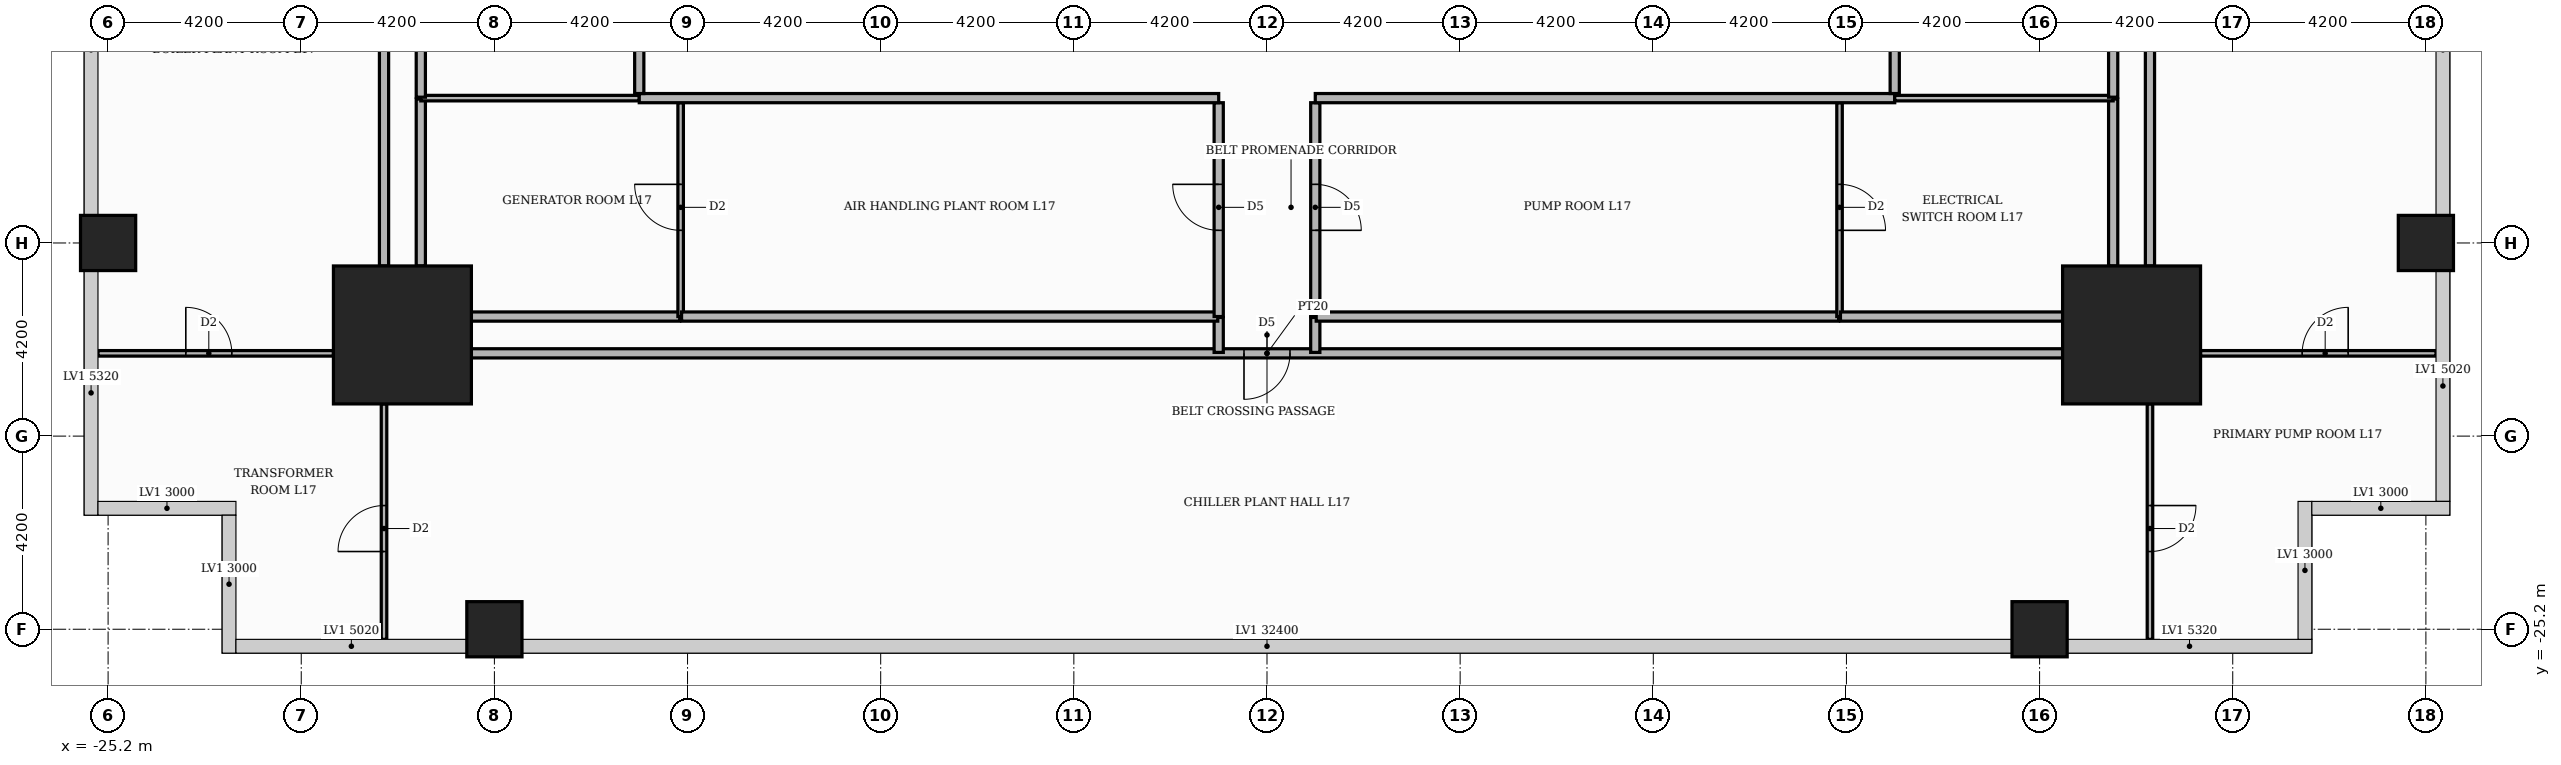
"""IFC4 building model, lengths in metres.
Left out: names, types, materials, properties, quantities, classifications, styles, units other than length and angle.
Written with IfcOpenShell. Run it as: python <this file> out.ifc"""

import sys

from ifc_helpers import new_model, si_unit, direction, frame, frame_2d, origin, origin_2d, place, context, subcontext, project, spatial, rectangle, extrude, element, fill, save


model = new_model("IFC4")
c1 = context("Model", 3, precision=1e-05, world=origin(), true_north=direction((0.0, 1.0)))
c2 = subcontext(c1, "Body", "Model", "MODEL_VIEW")
j1 = project(units=[si_unit("LENGTHUNIT", "METRE"), si_unit("PLANEANGLEUNIT", "RADIAN")], contexts=[c1])
p1 = place(None, origin())
s1 = spatial("IfcSite", under=j1, at=p1, CompositionType="ELEMENT")
p2 = place(p1, origin())
s2 = spatial("IfcBuilding", under=s1, at=p2, CompositionType="ELEMENT")
p3 = place(p2, frame((0.0, 0.0, 73.8)))
s3 = spatial("IfcBuildingStorey", under=s2, at=p3, CompositionType="ELEMENT", Elevation=73.8)
for number, where, z_axis, x_axis in (
    (1, (18.8, -18.8, 0.0), (0.0, 0.0, 1.0), (1.0, 0.0, 0.0)),
    (2, (-18.8, -18.8, 0.0), (0.0, 0.0, 1.0), (1.0, 0.0, 0.0)),
):
    element("IfcColumn", number, at=place(p3, frame(where, z_axis=z_axis, x_axis=x_axis)), inside=s3, PredefinedType="COLUMN", context=c2, shape_type="SweptSolid", body=[
        extrude(rectangle(XDim=3.0, YDim=3.0, at=origin_2d()), origin(), (0.0, 0.0, 1.0), 5.4),
    ])
for number, where, z_axis, x_axis in (
    (3, (25.2, -16.8, 0.0), (0.0, 0.0, 1.0), (1.0, 0.0, 0.0)),
    (4, (16.8, -25.2, 0.0), (0.0, 0.0, 1.0), (1.0, 0.0, 0.0)),
    (5, (-16.8, -25.2, 0.0), (0.0, 0.0, 1.0), (1.0, 0.0, 0.0)),
    (6, (-25.2, -16.8, 0.0), (0.0, 0.0, 1.0), (1.0, 0.0, 0.0)),
):
    element("IfcColumn", number, at=place(p3, frame(where, z_axis=z_axis, x_axis=x_axis)), inside=s3, PredefinedType="COLUMN", context=c2, shape_type="SweptSolid", body=[
        extrude(rectangle(XDim=1.2, YDim=1.2, at=origin_2d()), origin(), (0.0, 0.0, 1.0), 5.4),
    ])
p4 = place(p3, frame((-19.2, -25.42, 0.0), z_axis=(0.0, 0.0, 1.0), x_axis=(0.0, 1.0, 0.0)))
e7 = element("IfcWall", 7, at=p4, inside=s3, PredefinedType="PARTITIONING", context=c2, shape_type="SweptSolid", body=[
    extrude(rectangle(XDim=5.12, YDim=0.12, at=frame_2d((2.56, 0.0))), origin(), (0.0, 0.0, 1.0), 4.98),
])
p5 = place(p4, frame((1.91, 0.0, 0.0)))
e8 = element("IfcOpeningElement", 8, at=p5, cuts=e7, PredefinedType="OPENING", context=c2, shape_type="SweptSolid", body=[
    extrude(rectangle(XDim=1.0, YDim=2.1, at=frame_2d((0.5, 1.05))), frame((0.0, 0.07, 0.0), z_axis=(0.0, -1.0, 0.0), x_axis=(1.0, 0.0, 0.0)), (0.0, 0.0, 1.0), 0.14),
])
p6 = place(p3, frame((19.2, -25.42, 0.0), z_axis=(0.0, 0.0, 1.0), x_axis=(0.0, 1.0, 0.0)))
e9 = element("IfcWall", 9, at=p6, inside=s3, PredefinedType="PARTITIONING", context=c2, shape_type="SweptSolid", body=[
    extrude(rectangle(XDim=5.12, YDim=0.12, at=frame_2d((2.56, 0.0))), origin(), (0.0, 0.0, 1.0), 4.98),
])
p7 = place(p6, frame((1.91, 0.0, 0.0)))
e10 = element("IfcOpeningElement", 10, at=p7, cuts=e9, PredefinedType="OPENING", context=c2, shape_type="SweptSolid", body=[
    extrude(rectangle(XDim=1.0, YDim=2.1, at=frame_2d((0.5, 1.05))), frame((0.0, 0.07, 0.0), z_axis=(0.0, -1.0, 0.0), x_axis=(1.0, 0.0, 0.0)), (0.0, 0.0, 1.0), 0.14),
])
p8 = place(p3, frame((-25.42, -19.2, 0.0), z_axis=(0.0, 0.0, 1.0), x_axis=(1.0, 0.0, 0.0)))
e11 = element("IfcWall", 11, at=p8, inside=s3, PredefinedType="PARTITIONING", context=c2, shape_type="SweptSolid", body=[
    extrude(rectangle(XDim=5.12, YDim=0.12, at=frame_2d((2.56, 0.0))), origin(), (0.0, 0.0, 1.0), 4.98),
])
p9 = place(p8, frame((1.91, 0.0, 0.0)))
e12 = element("IfcOpeningElement", 12, at=p9, cuts=e11, PredefinedType="OPENING", context=c2, shape_type="SweptSolid", body=[
    extrude(rectangle(XDim=1.0, YDim=2.1, at=frame_2d((0.5, 1.05))), frame((0.0, 0.07, 0.0), z_axis=(0.0, -1.0, 0.0), x_axis=(1.0, 0.0, 0.0)), (0.0, 0.0, 1.0), 0.14),
])
p10 = place(p3, frame((-17.3, -19.2, 0.0), z_axis=(0.0, 0.0, 1.0), x_axis=(1.0, 0.0, 0.0)))
e13 = element("IfcWall", 13, at=p10, inside=s3, PredefinedType="PARTITIONING", context=c2, shape_type="SweptSolid", body=[
    extrude(rectangle(XDim=34.6, YDim=0.2, at=frame_2d((17.3, 0.0))), origin(), (0.0, 0.0, 1.0), 4.98),
])
p11 = place(p10, frame((16.8, 0.0, 0.0)))
e14 = element("IfcOpeningElement", 14, at=p11, cuts=e13, PredefinedType="OPENING", context=c2, shape_type="SweptSolid", body=[
    extrude(rectangle(XDim=1.0, YDim=2.1, at=frame_2d((0.5, 1.05))), frame((0.0, 0.11, 0.0), z_axis=(0.0, -1.0, 0.0), x_axis=(1.0, 0.0, 0.0)), (0.0, 0.0, 1.0), 0.22),
])
p12 = place(p3, frame((20.3, -19.2, 0.0), z_axis=(0.0, 0.0, 1.0), x_axis=(1.0, 0.0, 0.0)))
e15 = element("IfcWall", 15, at=p12, inside=s3, PredefinedType="PARTITIONING", context=c2, shape_type="SweptSolid", body=[
    extrude(rectangle(XDim=5.12, YDim=0.12, at=frame_2d((2.56, 0.0))), origin(), (0.0, 0.0, 1.0), 4.98),
])
p13 = place(p12, frame((2.21, 0.0, 0.0)))
e16 = element("IfcOpeningElement", 16, at=p13, cuts=e15, PredefinedType="OPENING", context=c2, shape_type="SweptSolid", body=[
    extrude(rectangle(XDim=1.0, YDim=2.1, at=frame_2d((0.5, 1.05))), frame((0.0, 0.07, 0.0), z_axis=(0.0, -1.0, 0.0), x_axis=(1.0, 0.0, 0.0)), (0.0, 0.0, 1.0), 0.14),
])
for number, where, z_axis, x_axis in (
    (17, (-1.05, -19.18, 0.0), (0.0, 0.0, 1.0), (0.0, 1.0, 0.0)),
    (18, (1.05, -19.18, 0.0), (0.0, 0.0, 1.0), (0.0, 1.0, 0.0)),
):
    element("IfcWall", number, at=place(p3, frame(where, z_axis=z_axis, x_axis=x_axis)), inside=s3, PredefinedType="PARTITIONING", context=c2, shape_type="SweptSolid", body=[
        extrude(rectangle(XDim=0.76, YDim=0.2, at=frame_2d((0.38, 0.0))), origin(), (0.0, 0.0, 1.0), 4.98),
    ])
p14 = place(p3, frame((-17.3, -18.4, 0.0), z_axis=(0.0, 0.0, 1.0), x_axis=(1.0, 0.0, 0.0)))
e19 = element("IfcWall", 19, at=p14, inside=s3, PredefinedType="PARTITIONING", context=c2, shape_type="SweptSolid", body=[
    extrude(rectangle(XDim=4.53, YDim=0.2, at=frame_2d((2.265, 0.0))), origin(), (0.0, 0.0, 1.0), 4.98),
])
p15 = place(p3, frame((-12.75, -18.4, 0.0), z_axis=(0.0, 0.0, 1.0), x_axis=(0.0, 1.0, 0.0)))
e20 = element("IfcWall", 20, at=p15, inside=s3, PredefinedType="PARTITIONING", context=c2, shape_type="SweptSolid", body=[
    extrude(rectangle(XDim=4.65, YDim=0.12, at=frame_2d((2.325, 0.0))), origin(), (0.0, 0.0, 1.0), 4.98),
])
p16 = place(p15, frame((1.875, 0.0, 0.0)))
e21 = element("IfcOpeningElement", 21, at=p16, cuts=e20, PredefinedType="OPENING", context=c2, shape_type="SweptSolid", body=[
    extrude(rectangle(XDim=1.0, YDim=2.1, at=frame_2d((0.5, 1.05))), frame((0.0, 0.07, 0.0), z_axis=(0.0, -1.0, 0.0), x_axis=(1.0, 0.0, 0.0)), (0.0, 0.0, 1.0), 0.14),
])
p17 = place(p3, frame((-12.73, -18.4, 0.0), z_axis=(0.0, 0.0, 1.0), x_axis=(1.0, 0.0, 0.0)))
e22 = element("IfcWall", 22, at=p17, inside=s3, PredefinedType="PARTITIONING", context=c2, shape_type="SweptSolid", body=[
    extrude(rectangle(XDim=11.66, YDim=0.2, at=frame_2d((5.83, 0.0))), origin(), (0.0, 0.0, 1.0), 4.98),
])
p18 = place(p3, frame((-1.05, -18.4, 0.0), z_axis=(0.0, 0.0, 1.0), x_axis=(0.0, 1.0, 0.0)))
e23 = element("IfcWall", 23, at=p18, inside=s3, PredefinedType="PARTITIONING", context=c2, shape_type="SweptSolid", body=[
    extrude(rectangle(XDim=4.65, YDim=0.2, at=frame_2d((2.325, 0.0))), origin(), (0.0, 0.0, 1.0), 4.98),
])
p19 = place(p18, frame((1.875, 0.0, 0.0)))
e24 = element("IfcOpeningElement", 24, at=p19, cuts=e23, PredefinedType="OPENING", context=c2, shape_type="SweptSolid", body=[
    extrude(rectangle(XDim=1.0, YDim=2.1, at=frame_2d((0.5, 1.05))), frame((0.0, 0.11, 0.0), z_axis=(0.0, -1.0, 0.0), x_axis=(1.0, 0.0, 0.0)), (0.0, 0.0, 1.0), 0.22),
])
p20 = place(p3, frame((1.05, -18.4, 0.0), z_axis=(0.0, 0.0, 1.0), x_axis=(0.0, 1.0, 0.0)))
e25 = element("IfcWall", 25, at=p20, inside=s3, PredefinedType="PARTITIONING", context=c2, shape_type="SweptSolid", body=[
    extrude(rectangle(XDim=4.65, YDim=0.2, at=frame_2d((2.325, 0.0))), origin(), (0.0, 0.0, 1.0), 4.98),
])
p21 = place(p20, frame((1.875, 0.0, 0.0)))
e26 = element("IfcOpeningElement", 26, at=p21, cuts=e25, PredefinedType="OPENING", context=c2, shape_type="SweptSolid", body=[
    extrude(rectangle(XDim=1.0, YDim=2.1, at=frame_2d((0.5, 1.05))), frame((0.0, 0.11, 0.0), z_axis=(0.0, -1.0, 0.0), x_axis=(1.0, 0.0, 0.0)), (0.0, 0.0, 1.0), 0.22),
])
p22 = place(p3, frame((1.07, -18.4, 0.0), z_axis=(0.0, 0.0, 1.0), x_axis=(1.0, 0.0, 0.0)))
e27 = element("IfcWall", 27, at=p22, inside=s3, PredefinedType="PARTITIONING", context=c2, shape_type="SweptSolid", body=[
    extrude(rectangle(XDim=11.36, YDim=0.2, at=frame_2d((5.68, 0.0))), origin(), (0.0, 0.0, 1.0), 4.98),
])
p23 = place(p3, frame((12.45, -18.4, 0.0), z_axis=(0.0, 0.0, 1.0), x_axis=(0.0, 1.0, 0.0)))
e28 = element("IfcWall", 28, at=p23, inside=s3, PredefinedType="PARTITIONING", context=c2, shape_type="SweptSolid", body=[
    extrude(rectangle(XDim=4.65, YDim=0.12, at=frame_2d((2.325, 0.0))), origin(), (0.0, 0.0, 1.0), 4.98),
])
p24 = place(p23, frame((1.875, 0.0, 0.0)))
e29 = element("IfcOpeningElement", 29, at=p24, cuts=e28, PredefinedType="OPENING", context=c2, shape_type="SweptSolid", body=[
    extrude(rectangle(XDim=1.0, YDim=2.1, at=frame_2d((0.5, 1.05))), frame((0.0, 0.07, 0.0), z_axis=(0.0, -1.0, 0.0), x_axis=(1.0, 0.0, 0.0)), (0.0, 0.0, 1.0), 0.14),
])
p25 = place(p3, frame((12.47, -18.4, 0.0), z_axis=(0.0, 0.0, 1.0), x_axis=(1.0, 0.0, 0.0)))
e30 = element("IfcWall", 30, at=p25, inside=s3, PredefinedType="PARTITIONING", context=c2, shape_type="SweptSolid", body=[
    extrude(rectangle(XDim=4.83, YDim=0.2, at=frame_2d((2.415, 0.0))), origin(), (0.0, 0.0, 1.0), 4.98),
])
p26 = place(p3, frame((-19.2, -17.3, 0.0), z_axis=(0.0, 0.0, 1.0), x_axis=(0.0, 1.0, 0.0)))
e31 = element("IfcWall", 31, at=p26, inside=s3, PredefinedType="PARTITIONING", context=c2, shape_type="SweptSolid", body=[
    extrude(rectangle(XDim=13.08, YDim=0.2, at=frame_2d((6.54, 0.0))), origin(), (0.0, 0.0, 1.0), 4.98),
])
for number, where, z_axis, x_axis in (
    (32, (-18.4, -17.3, 0.0), (0.0, 0.0, 1.0), (0.0, 1.0, 0.0)),
    (33, (18.4, -17.3, 0.0), (0.0, 0.0, 1.0), (0.0, 1.0, 0.0)),
):
    element("IfcWall", number, at=place(p3, frame(where, z_axis=z_axis, x_axis=x_axis)), inside=s3, PredefinedType="PARTITIONING", context=c2, shape_type="SweptSolid", body=[
        extrude(rectangle(XDim=3.63, YDim=0.2, at=frame_2d((1.815, 0.0))), origin(), (0.0, 0.0, 1.0), 4.98),
    ])
p27 = place(p3, frame((19.2, -17.3, 0.0), z_axis=(0.0, 0.0, 1.0), x_axis=(0.0, 1.0, 0.0)))
e34 = element("IfcWall", 34, at=p27, inside=s3, PredefinedType="PARTITIONING", context=c2, shape_type="SweptSolid", body=[
    extrude(rectangle(XDim=34.6, YDim=0.2, at=frame_2d((17.3, 0.0))), origin(), (0.0, 0.0, 1.0), 4.98),
])
p28 = place(p3, frame((-18.4, -13.65, 0.0), z_axis=(0.0, 0.0, 1.0), x_axis=(1.0, 0.0, 0.0)))
e35 = element("IfcWall", 35, at=p28, inside=s3, PredefinedType="PARTITIONING", context=c2, shape_type="SweptSolid", body=[
    extrude(rectangle(XDim=4.75, YDim=0.12, at=frame_2d((2.375, 0.0))), origin(), (0.0, 0.0, 1.0), 4.98),
])
for number, where, z_axis, x_axis in (
    (36, (-13.65, -13.65, 0.0), (0.0, 0.0, 1.0), (1.0, 0.0, 0.0)),
    (37, (1.05, -13.65, 0.0), (0.0, 0.0, 1.0), (1.0, 0.0, 0.0)),
):
    element("IfcWall", number, at=place(p3, frame(where, z_axis=z_axis, x_axis=x_axis)), inside=s3, PredefinedType="PARTITIONING", context=c2, shape_type="SweptSolid", body=[
        extrude(rectangle(XDim=12.6, YDim=0.2, at=frame_2d((6.3, 0.0))), origin(), (0.0, 0.0, 1.0), 4.98),
    ])
p29 = place(p3, frame((13.65, -13.65, 0.0), z_axis=(0.0, 0.0, 1.0), x_axis=(1.0, 0.0, 0.0)))
e38 = element("IfcWall", 38, at=p29, inside=s3, PredefinedType="PARTITIONING", context=c2, shape_type="SweptSolid", body=[
    extrude(rectangle(XDim=4.75, YDim=0.12, at=frame_2d((2.375, 0.0))), origin(), (0.0, 0.0, 1.0), 4.98),
])
p30 = place(p3, frame((-18.4, -13.63, 0.0), z_axis=(0.0, 0.0, 1.0), x_axis=(0.0, 1.0, 0.0)))
e39 = element("IfcWall", 39, at=p30, inside=s3, PredefinedType="PARTITIONING", context=c2, shape_type="SweptSolid", body=[
    extrude(rectangle(XDim=30.93, YDim=0.2, at=frame_2d((15.465, 0.0))), origin(), (0.0, 0.0, 1.0), 4.98),
])
p31 = place(p3, frame((18.4, -13.63, 0.0), z_axis=(0.0, 0.0, 1.0), x_axis=(0.0, 1.0, 0.0)))
e40 = element("IfcWall", 40, at=p31, inside=s3, PredefinedType="PARTITIONING", context=c2, shape_type="SweptSolid", body=[
    extrude(rectangle(XDim=12.41, YDim=0.2, at=frame_2d((6.205, 0.0))), origin(), (0.0, 0.0, 1.0), 4.98),
])
p32 = place(p3, frame((-13.65, -13.55, 0.0), z_axis=(0.0, 0.0, 1.0), x_axis=(0.0, 1.0, 0.0)))
e41 = element("IfcWall", 41, at=p32, inside=s3, PredefinedType="PARTITIONING", context=c2, shape_type="SweptSolid", body=[
    extrude(rectangle(XDim=27.1, YDim=0.2, at=frame_2d((13.55, 0.0))), origin(), (0.0, 0.0, 1.0), 4.98),
])
p33 = place(p3, frame((13.65, -13.55, 0.0), z_axis=(0.0, 0.0, 1.0), x_axis=(0.0, 1.0, 0.0)))
e42 = element("IfcWall", 42, at=p33, inside=s3, PredefinedType="PARTITIONING", context=c2, shape_type="SweptSolid", body=[
    extrude(rectangle(XDim=27.1, YDim=0.2, at=frame_2d((13.55, 0.0))), origin(), (0.0, 0.0, 1.0), 4.98),
])
p34 = place(p33, frame((5.625, 0.0, 0.0)))
e43 = element("IfcOpeningElement", 43, at=p34, cuts=e42, PredefinedType="OPENING", context=c2, shape_type="SweptSolid", body=[
    extrude(rectangle(XDim=1.0, YDim=2.1, at=frame_2d((0.5, 1.05))), frame((0.0, 0.11, 0.0), z_axis=(0.0, -1.0, 0.0), x_axis=(1.0, 0.0, 0.0)), (0.0, 0.0, 1.0), 0.22),
])
p35 = place(p19, origin())
e44 = element("IfcDoor", 44, at=p35, inside=s3, OperationType="SINGLE_SWING_RIGHT", PredefinedType="DOOR", context=c2, shape_type="SweptSolid", body=[
    extrude(rectangle(XDim=1.0, YDim=2.1, at=frame_2d((0.5, 1.05))), frame((0.0, 0.025, 0.0), z_axis=(0.0, -1.0, 0.0), x_axis=(1.0, 0.0, 0.0)), (0.0, 0.0, 1.0), 0.05),
])
fill(e24, e44)
p36 = place(p21, frame((1.0, 0.0, 0.0), z_axis=(0.0, 0.0, 1.0), x_axis=(-1.0, 0.0, 0.0)))
e45 = element("IfcDoor", 45, at=p36, inside=s3, OperationType="SINGLE_SWING_LEFT", PredefinedType="DOOR", context=c2, shape_type="SweptSolid", body=[
    extrude(rectangle(XDim=1.0, YDim=2.1, at=frame_2d((0.5, 1.05))), frame((0.0, 0.025, 0.0), z_axis=(0.0, -1.0, 0.0), x_axis=(1.0, 0.0, 0.0)), (0.0, 0.0, 1.0), 0.05),
])
fill(e26, e45)
p37 = place(p24, frame((1.0, 0.0, 0.0), z_axis=(0.0, 0.0, 1.0), x_axis=(-1.0, 0.0, 0.0)))
e46 = element("IfcDoor", 46, at=p37, inside=s3, OperationType="SINGLE_SWING_LEFT", PredefinedType="DOOR", context=c2, shape_type="SweptSolid", body=[
    extrude(rectangle(XDim=1.0, YDim=2.1, at=frame_2d((0.5, 1.05))), frame((0.0, 0.025, 0.0), z_axis=(0.0, -1.0, 0.0), x_axis=(1.0, 0.0, 0.0)), (0.0, 0.0, 1.0), 0.05),
])
fill(e29, e46)
p38 = place(p16, origin())
e47 = element("IfcDoor", 47, at=p38, inside=s3, OperationType="SINGLE_SWING_RIGHT", PredefinedType="DOOR", context=c2, shape_type="SweptSolid", body=[
    extrude(rectangle(XDim=1.0, YDim=2.1, at=frame_2d((0.5, 1.05))), frame((0.0, 0.025, 0.0), z_axis=(0.0, -1.0, 0.0), x_axis=(1.0, 0.0, 0.0)), (0.0, 0.0, 1.0), 0.05),
])
fill(e21, e47)
p39 = place(p11, frame((1.0, 0.0, 0.0), z_axis=(0.0, 0.0, 1.0), x_axis=(-1.0, 0.0, 0.0)))
e48 = element("IfcDoor", 48, at=p39, inside=s3, OperationType="SINGLE_SWING_LEFT", PredefinedType="DOOR", context=c2, shape_type="SweptSolid", body=[
    extrude(rectangle(XDim=1.0, YDim=2.1, at=frame_2d((0.5, 1.05))), frame((0.0, 0.025, 0.0), z_axis=(0.0, -1.0, 0.0), x_axis=(1.0, 0.0, 0.0)), (0.0, 0.0, 1.0), 0.05),
])
fill(e14, e48)
p40 = place(p7, frame((1.0, 0.0, 0.0), z_axis=(0.0, 0.0, 1.0), x_axis=(-1.0, 0.0, 0.0)))
e49 = element("IfcDoor", 49, at=p40, inside=s3, OperationType="SINGLE_SWING_RIGHT", PredefinedType="DOOR", context=c2, shape_type="SweptSolid", body=[
    extrude(rectangle(XDim=1.0, YDim=2.1, at=frame_2d((0.5, 1.05))), frame((0.0, 0.025, 0.0), z_axis=(0.0, -1.0, 0.0), x_axis=(1.0, 0.0, 0.0)), (0.0, 0.0, 1.0), 0.05),
])
fill(e10, e49)
p41 = place(p5, origin())
e50 = element("IfcDoor", 50, at=p41, inside=s3, OperationType="SINGLE_SWING_LEFT", PredefinedType="DOOR", context=c2, shape_type="SweptSolid", body=[
    extrude(rectangle(XDim=1.0, YDim=2.1, at=frame_2d((0.5, 1.05))), frame((0.0, 0.025, 0.0), z_axis=(0.0, -1.0, 0.0), x_axis=(1.0, 0.0, 0.0)), (0.0, 0.0, 1.0), 0.05),
])
fill(e8, e50)
p42 = place(p13, origin())
e51 = element("IfcDoor", 51, at=p42, inside=s3, OperationType="SINGLE_SWING_RIGHT", PredefinedType="DOOR", context=c2, shape_type="SweptSolid", body=[
    extrude(rectangle(XDim=1.0, YDim=2.1, at=frame_2d((0.5, 1.05))), frame((0.0, 0.025, 0.0), z_axis=(0.0, -1.0, 0.0), x_axis=(1.0, 0.0, 0.0)), (0.0, 0.0, 1.0), 0.05),
])
fill(e16, e51)
p43 = place(p9, origin())
e52 = element("IfcDoor", 52, at=p43, inside=s3, OperationType="SINGLE_SWING_LEFT", PredefinedType="DOOR", context=c2, shape_type="SweptSolid", body=[
    extrude(rectangle(XDim=1.0, YDim=2.1, at=frame_2d((0.5, 1.05))), frame((0.0, 0.025, 0.0), z_axis=(0.0, -1.0, 0.0), x_axis=(1.0, 0.0, 0.0)), (0.0, 0.0, 1.0), 0.05),
])
fill(e12, e52)
save(model, sys.argv[1])
